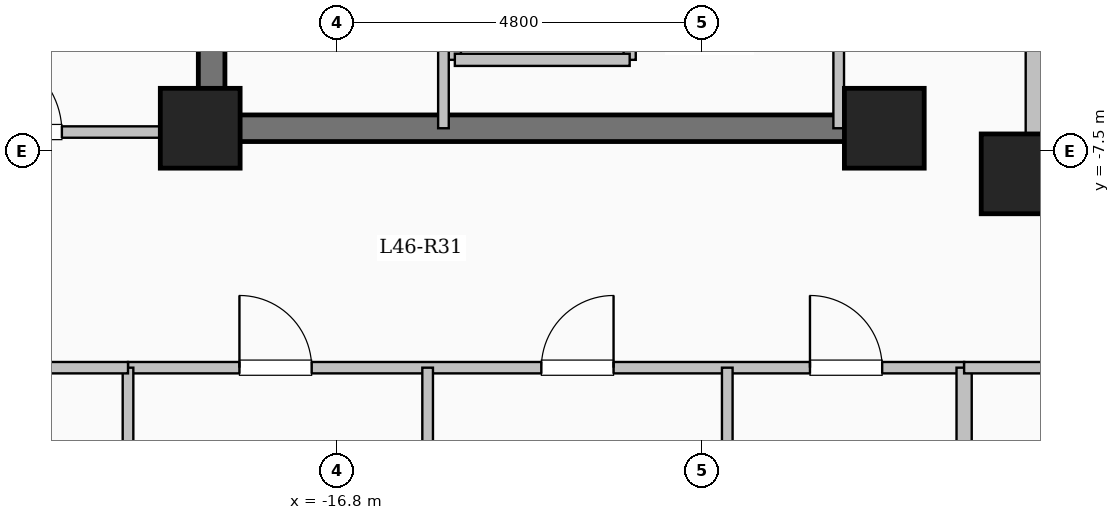
"""IFC4 building model, lengths in metres.
Left out: names, types, materials, properties, quantities, classifications, styles, units other than length and angle.
Written with IfcOpenShell. Run it as: python <this file> out.ifc"""

import sys

from ifc_helpers import new_model, si_unit, direction, frame, frame_2d, origin, origin_2d, place, context, subcontext, project, spatial, rectangle, extrude, element, fill, save


model = new_model("IFC4")
c1 = context("Model", 3, precision=1e-05, world=origin(), true_north=direction((0.0, 1.0)))
c2 = subcontext(c1, "Body", "Model", "MODEL_VIEW")
j1 = project(units=[si_unit("LENGTHUNIT", "METRE"), si_unit("PLANEANGLEUNIT", "RADIAN")], contexts=[c1])
p1 = place(None, origin())
s1 = spatial("IfcSite", under=j1, at=p1, CompositionType="ELEMENT")
p2 = place(p1, origin())
s2 = spatial("IfcBuilding", under=s1, at=p2, CompositionType="ELEMENT")
p3 = place(p2, frame((0.0, 0.0, 169.45)))
s3 = spatial("IfcBuildingStorey", under=s2, at=p3, CompositionType="ELEMENT", Elevation=169.45)
for number, where, z_axis, x_axis in (
    (1, (-7.8, -7.8, 0.0), (0.0, 0.0, 1.0), (1.0, 0.0, 0.0)),
    (2, (-9.6, -7.2, 0.0), (0.0, 0.0, 1.0), (1.0, 0.0, 0.0)),
    (3, (-18.6, -7.2, 0.0), (0.0, 0.0, 1.0), (1.0, 0.0, 0.0)),
):
    element("IfcColumn", number, at=place(p3, frame(where, z_axis=z_axis, x_axis=x_axis)), inside=s3, PredefinedType="COLUMN", context=c2, shape_type="SweptSolid", body=[
        extrude(rectangle(XDim=1.05, YDim=1.05, at=origin_2d()), origin(), (0.0, 0.0, 1.0), 3.35),
    ])
p4 = place(p3, frame((-7.62, -7.62, 0.0), z_axis=(0.0, 0.0, 1.0), x_axis=(1.0, 0.0, 0.0)))
e4 = element("IfcWall", 4, at=p4, inside=s3, PredefinedType="SOLIDWALL", context=c2, shape_type="SweptSolid", body=[
    extrude(rectangle(XDim=15.24, YDim=0.24, at=frame_2d((7.62, 0.0))), origin(), (0.0, 0.0, 1.0), 3.05),
])
p5 = place(p4, frame((6.92, 0.0, 0.95)))
e5 = element("IfcOpeningElement", 5, at=p5, cuts=e4, PredefinedType="OPENING", context=c2, shape_type="SweptSolid", body=[
    extrude(rectangle(XDim=1.4, YDim=1.5, at=frame_2d((0.7, 0.75))), frame((0.0, 0.13, 0.0), z_axis=(0.0, -1.0, 0.0), x_axis=(1.0, 0.0, 0.0)), (0.0, 0.0, 1.0), 0.26),
])
p6 = place(p3, frame((-7.62, 7.62, 0.0), z_axis=(0.0, 0.0, 1.0), x_axis=(0.0, -1.0, 0.0)))
e6 = element("IfcWall", 6, at=p6, inside=s3, PredefinedType="SOLIDWALL", context=c2, shape_type="SweptSolid", body=[
    extrude(rectangle(XDim=15.24, YDim=0.24, at=frame_2d((7.62, 0.0))), origin(), (0.0, 0.0, 1.0), 3.05),
])
p7 = place(p6, frame((6.92, 0.0, 0.95)))
e7 = element("IfcOpeningElement", 7, at=p7, cuts=e6, PredefinedType="OPENING", context=c2, shape_type="SweptSolid", body=[
    extrude(rectangle(XDim=1.4, YDim=1.5, at=frame_2d((0.7, 0.75))), frame((0.0, 0.13, 0.0), z_axis=(0.0, -1.0, 0.0), x_axis=(1.0, 0.0, 0.0)), (0.0, 0.0, 1.0), 0.26),
])
for number, where, z_axis, x_axis in (
    (8, (-15.25, -6.3, 0.0), (0.0, 0.0, 1.0), (0.0, 1.0, 0.0)),
    (9, (-12.95, -6.3, 0.0), (0.0, 0.0, 1.0), (0.0, 1.0, 0.0)),
):
    element("IfcWall", number, at=place(p3, frame(where, z_axis=z_axis, x_axis=x_axis)), inside=s3, PredefinedType="SOLIDWALL", context=c2, shape_type="SweptSolid", body=[
        extrude(rectangle(XDim=2.6, YDim=0.16, at=frame_2d((1.3, 0.0))), origin(), (0.0, 0.0, 1.0), 3.05),
    ])
p8 = place(p3, frame((-15.25, -6.3, 0.0), z_axis=(0.0, 0.0, 1.0), x_axis=(1.0, 0.0, 0.0)))
e10 = element("IfcWall", 10, at=p8, inside=s3, PredefinedType="SOLIDWALL", context=c2, shape_type="SweptSolid", body=[
    extrude(rectangle(XDim=2.3, YDim=0.16, at=frame_2d((1.15, 0.0))), origin(), (0.0, 0.0, 1.0), 3.05),
])
p9 = place(p3, frame((-18.45, -7.375, 0.0), z_axis=(0.0, 0.0, 1.0), x_axis=(0.0, 1.0, 0.0)))
e11 = element("IfcWall", 11, at=p9, inside=s3, PredefinedType="SHEAR", context=c2, shape_type="SweptSolid", body=[
    extrude(rectangle(XDim=14.05, YDim=0.35, at=frame_2d((7.025, 0.0))), origin(), (0.0, 0.0, 1.0), 3.35),
])
p10 = place(p3, frame((-18.625, -7.2, 0.0), z_axis=(0.0, 0.0, 1.0), x_axis=(1.0, 0.0, 0.0)))
e12 = element("IfcWall", 12, at=p10, inside=s3, PredefinedType="SHEAR", context=c2, shape_type="SweptSolid", body=[
    extrude(rectangle(XDim=8.55, YDim=0.35, at=frame_2d((4.275, 0.0))), origin(), (0.0, 0.0, 1.0), 3.35),
])
p11 = place(p3, frame((-15.4, -7.2, 0.0), z_axis=(0.0, 0.0, 1.0), x_axis=(0.0, 1.0, 0.0)))
e13 = element("IfcWall", 13, at=p11, inside=s3, PredefinedType="PARTITIONING", context=c2, shape_type="SweptSolid", body=[
    extrude(rectangle(XDim=10.45, YDim=0.14, at=frame_2d((5.225, 0.0))), origin(), (0.0, 0.0, 1.0), 3.05),
])
p12 = place(p11, frame((9.25, 0.0, 0.0)))
e14 = element("IfcOpeningElement", 14, at=p12, cuts=e13, PredefinedType="OPENING", context=c2, shape_type="SweptSolid", body=[
    extrude(rectangle(XDim=0.9, YDim=2.08, at=frame_2d((0.45, 1.04))), frame((0.0, 0.08, 0.0), z_axis=(0.0, -1.0, 0.0), x_axis=(1.0, 0.0, 0.0)), (0.0, 0.0, 1.0), 0.16),
])
p13 = place(p3, frame((-10.2, -7.2, 0.0), z_axis=(0.0, 0.0, 1.0), x_axis=(0.0, 1.0, 0.0)))
e15 = element("IfcWall", 15, at=p13, inside=s3, PredefinedType="PARTITIONING", context=c2, shape_type="SweptSolid", body=[
    extrude(rectangle(XDim=9.12, YDim=0.14, at=frame_2d((4.56, 0.0))), origin(), (0.0, 0.0, 1.0), 3.05),
])
p14 = place(p13, frame((1.9, 0.0, 0.0)))
e16 = element("IfcOpeningElement", 16, at=p14, cuts=e15, PredefinedType="OPENING", context=c2, shape_type="SweptSolid", body=[
    extrude(rectangle(XDim=0.95, YDim=2.12, at=frame_2d((0.475, 1.06))), frame((0.0, 0.08, 0.0), z_axis=(0.0, -1.0, 0.0), x_axis=(1.0, 0.0, 0.0)), (0.0, 0.0, 1.0), 0.16),
])
p15 = place(p13, frame((5.0, 0.0, 0.0)))
e17 = element("IfcOpeningElement", 17, at=p15, cuts=e15, PredefinedType="OPENING", context=c2, shape_type="SweptSolid", body=[
    extrude(rectangle(XDim=0.95, YDim=2.12, at=frame_2d((0.475, 1.06))), frame((0.0, 0.08, 0.0), z_axis=(0.0, -1.0, 0.0), x_axis=(1.0, 0.0, 0.0)), (0.0, 0.0, 1.0), 0.16),
])
p16 = place(p3, frame((-19.55, -10.35, 0.0), z_axis=(0.0, 0.0, 1.0), x_axis=(1.0, 0.0, 0.0)))
e18 = element("IfcWall", 18, at=p16, inside=s3, PredefinedType="PARTITIONING", context=c2, shape_type="SweptSolid", body=[
    extrude(rectangle(XDim=11.0, YDim=0.15, at=frame_2d((5.5, 0.0))), origin(), (0.0, 0.0, 1.0), 3.05),
])
p17 = place(p16, frame((1.466, 0.0, 0.0)))
e19 = element("IfcOpeningElement", 19, at=p17, cuts=e18, PredefinedType="OPENING", context=c2, shape_type="SweptSolid", body=[
    extrude(rectangle(XDim=0.95, YDim=2.15, at=frame_2d((0.475, 1.075))), frame((0.0, 0.085, 0.0), z_axis=(0.0, -1.0, 0.0), x_axis=(1.0, 0.0, 0.0)), (0.0, 0.0, 1.0), 0.17),
])
p18 = place(p16, frame((5.438, 0.0, 0.0)))
e20 = element("IfcOpeningElement", 20, at=p18, cuts=e18, PredefinedType="OPENING", context=c2, shape_type="SweptSolid", body=[
    extrude(rectangle(XDim=0.95, YDim=2.15, at=frame_2d((0.475, 1.075))), frame((0.0, 0.085, 0.0), z_axis=(0.0, -1.0, 0.0), x_axis=(1.0, 0.0, 0.0)), (0.0, 0.0, 1.0), 0.17),
])
p19 = place(p16, frame((8.972, 0.0, 0.0)))
e21 = element("IfcOpeningElement", 21, at=p19, cuts=e18, PredefinedType="OPENING", context=c2, shape_type="SweptSolid", body=[
    extrude(rectangle(XDim=0.95, YDim=2.15, at=frame_2d((0.475, 1.075))), frame((0.0, 0.085, 0.0), z_axis=(0.0, -1.0, 0.0), x_axis=(1.0, 0.0, 0.0)), (0.0, 0.0, 1.0), 0.17),
])
for number, where, z_axis, x_axis in (
    (22, (-15.608, -21.15, 0.0), (0.0, 0.0, 1.0), (0.0, 1.0, 0.0)),
    (23, (-11.666, -21.15, 0.0), (0.0, 0.0, 1.0), (0.0, 1.0, 0.0)),
):
    element("IfcWall", number, at=place(p3, frame(where, z_axis=z_axis, x_axis=x_axis)), inside=s3, PredefinedType="PARTITIONING", context=c2, shape_type="SweptSolid", body=[
        extrude(rectangle(XDim=10.8, YDim=0.14, at=frame_2d((5.4, 0.0))), origin(), (0.0, 0.0, 1.0), 3.05),
    ])
p20 = place(p3, frame((-8.55, -21.804, 0.0), z_axis=(0.0, 0.0, 1.0), x_axis=(0.0, 1.0, 0.0)))
e24 = element("IfcWall", 24, at=p20, inside=s3, PredefinedType="SOLIDWALL", context=c2, shape_type="SweptSolid", body=[
    extrude(rectangle(XDim=11.454, YDim=0.2, at=frame_2d((5.727, 0.0))), origin(), (0.0, 0.0, 1.0), 3.05),
])
p21 = place(p3, frame((-8.55, -10.35, 0.0), z_axis=(0.0, 0.0, 1.0), x_axis=(1.0, 0.0, 0.0)))
e25 = element("IfcWall", 25, at=p21, inside=s3, PredefinedType="PARTITIONING", context=c2, shape_type="SweptSolid", body=[
    extrude(rectangle(XDim=17.1, YDim=0.15, at=frame_2d((8.55, 0.0))), origin(), (0.0, 0.0, 1.0), 3.05),
])
p22 = place(p21, frame((1.6, 0.0, 0.0)))
e26 = element("IfcOpeningElement", 26, at=p22, cuts=e25, PredefinedType="OPENING", context=c2, shape_type="SweptSolid", body=[
    extrude(rectangle(XDim=0.96, YDim=2.15, at=frame_2d((0.48, 1.075))), frame((0.0, 0.085, 0.0), z_axis=(0.0, -1.0, 0.0), x_axis=(1.0, 0.0, 0.0)), (0.0, 0.0, 1.0), 0.17),
])
p23 = place(p3, frame((-25.08, -7.25, 0.0), z_axis=(0.0, 0.0, 1.0), x_axis=(1.0, 0.0, 0.0)))
e27 = element("IfcWall", 27, at=p23, inside=s3, PredefinedType="PARTITIONING", context=c2, shape_type="SweptSolid", body=[
    extrude(rectangle(XDim=6.63, YDim=0.15, at=frame_2d((3.315, 0.0))), origin(), (0.0, 0.0, 1.0), 3.05),
])
p24 = place(p23, frame((3.58, 0.0, 0.0)))
e28 = element("IfcOpeningElement", 28, at=p24, cuts=e27, PredefinedType="OPENING", context=c2, shape_type="SweptSolid", body=[
    extrude(rectangle(XDim=1.08, YDim=2.15, at=frame_2d((0.54, 1.075))), frame((0.0, 0.085, 0.0), z_axis=(0.0, -1.0, 0.0), x_axis=(1.0, 0.0, 0.0)), (0.0, 0.0, 1.0), 0.17),
])
p25 = place(p3, frame((-19.55, -17.25, 0.0), z_axis=(0.0, 0.0, 1.0), x_axis=(0.0, 1.0, 0.0)))
e29 = element("IfcWall", 29, at=p25, inside=s3, PredefinedType="PARTITIONING", context=c2, shape_type="SweptSolid", body=[
    extrude(rectangle(XDim=6.9, YDim=0.14, at=frame_2d((3.45, 0.0))), origin(), (0.0, 0.0, 1.0), 3.05),
])
p26 = place(p3, frame((-25.08, -10.35, 0.0), z_axis=(0.0, 0.0, 1.0), x_axis=(1.0, 0.0, 0.0)))
e30 = element("IfcWall", 30, at=p26, inside=s3, PredefinedType="PARTITIONING", context=c2, shape_type="SweptSolid", body=[
    extrude(rectangle(XDim=5.53, YDim=0.15, at=frame_2d((2.765, 0.0))), origin(), (0.0, 0.0, 1.0), 3.05),
])
p27 = place(p26, frame((2.29, 0.0, 0.0)))
e31 = element("IfcOpeningElement", 31, at=p27, cuts=e30, PredefinedType="OPENING", context=c2, shape_type="SweptSolid", body=[
    extrude(rectangle(XDim=0.95, YDim=2.15, at=frame_2d((0.475, 1.075))), frame((0.0, 0.085, 0.0), z_axis=(0.0, -1.0, 0.0), x_axis=(1.0, 0.0, 0.0)), (0.0, 0.0, 1.0), 0.17),
])
p28 = place(p17, origin())
e32 = element("IfcDoor", 32, at=p28, inside=s3, OperationType="SINGLE_SWING_LEFT", PredefinedType="DOOR", context=c2, shape_type="SweptSolid", body=[
    extrude(rectangle(XDim=0.95, YDim=2.15, at=frame_2d((0.475, 1.075))), frame((0.0, 0.025, 0.0), z_axis=(0.0, -1.0, 0.0), x_axis=(1.0, 0.0, 0.0)), (0.0, 0.0, 1.0), 0.05),
])
fill(e19, e32)
p29 = place(p18, origin())
e33 = element("IfcDoor", 33, at=p29, inside=s3, OperationType="SINGLE_SWING_RIGHT", PredefinedType="DOOR", context=c2, shape_type="SweptSolid", body=[
    extrude(rectangle(XDim=0.95, YDim=2.15, at=frame_2d((0.475, 1.075))), frame((0.0, 0.025, 0.0), z_axis=(0.0, -1.0, 0.0), x_axis=(1.0, 0.0, 0.0)), (0.0, 0.0, 1.0), 0.05),
])
fill(e20, e33)
p30 = place(p19, origin())
e34 = element("IfcDoor", 34, at=p30, inside=s3, OperationType="SINGLE_SWING_LEFT", PredefinedType="DOOR", context=c2, shape_type="SweptSolid", body=[
    extrude(rectangle(XDim=0.95, YDim=2.15, at=frame_2d((0.475, 1.075))), frame((0.0, 0.025, 0.0), z_axis=(0.0, -1.0, 0.0), x_axis=(1.0, 0.0, 0.0)), (0.0, 0.0, 1.0), 0.05),
])
fill(e21, e34)
p31 = place(p24, origin())
e35 = element("IfcDoor", 35, at=p31, inside=s3, OperationType="SINGLE_SWING_LEFT", PredefinedType="DOOR", context=c2, shape_type="SweptSolid", body=[
    extrude(rectangle(XDim=1.08, YDim=2.15, at=frame_2d((0.54, 1.075))), frame((0.0, 0.025, 0.0), z_axis=(0.0, -1.0, 0.0), x_axis=(1.0, 0.0, 0.0)), (0.0, 0.0, 1.0), 0.05),
])
fill(e28, e35)
save(model, sys.argv[1])
